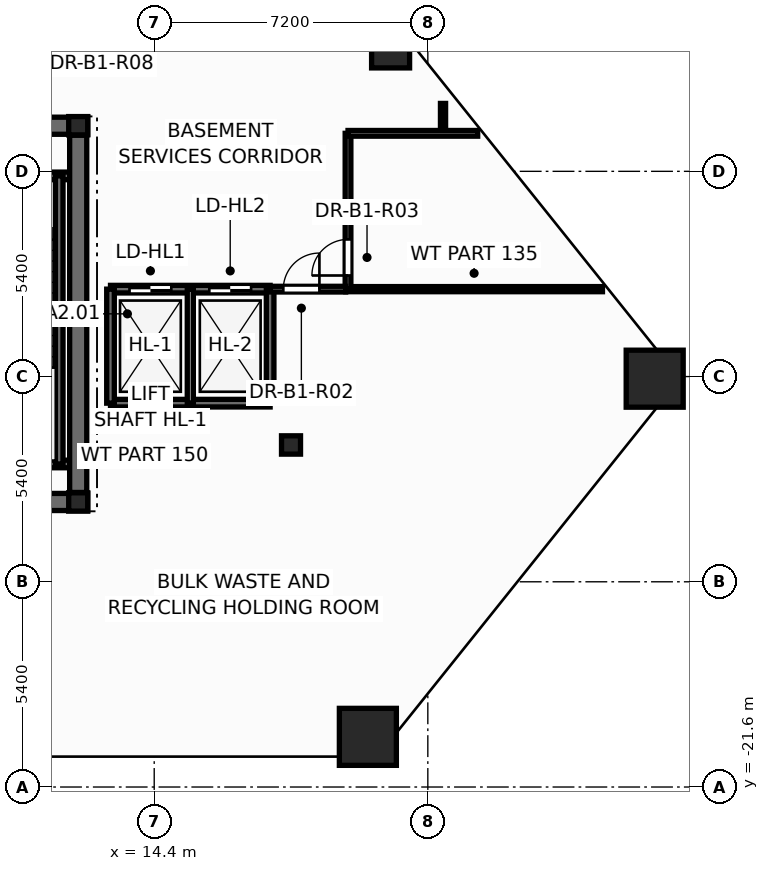
"""IFC4 building model, lengths in metres.
Left out: names, types, materials, properties, quantities, classifications, styles, units other than length and angle.
Written with IfcOpenShell. Run it as: python <this file> out.ifc"""

import sys

from ifc_helpers import new_model, si_unit, direction, frame, frame_2d, origin, origin_2d, place, context, subcontext, project, spatial, rectangle, hollow_rectangle, hollow_circle, i_section, extrude, element, fill, save


model = new_model("IFC4")
c1 = context("Model", 3, precision=1e-05, world=origin(), true_north=direction((0.0, 1.0)))
c2 = subcontext(c1, "Body", "Model", "MODEL_VIEW")
j1 = project(units=[si_unit("LENGTHUNIT", "METRE"), si_unit("PLANEANGLEUNIT", "RADIAN")], contexts=[c1])
p1 = place(None, origin())
s1 = spatial("IfcSite", under=j1, at=p1, CompositionType="ELEMENT")
p2 = place(p1, origin())
s2 = spatial("IfcBuilding", under=s1, at=p2, CompositionType="ELEMENT")
p3 = place(p2, frame((0.0, 0.0, -4.8)))
s3 = spatial("IfcBuildingStorey", under=s2, at=p3, CompositionType="ELEMENT", Elevation=-4.8)
for number, where, z_axis, x_axis in (
    (1, (20.022, -20.28, 0.0), (0.0, 0.0, 1.0), (1.0, 0.0, 0.0)),
    (2, (27.57, -10.856, 0.0), (0.0, 0.0, 1.0), (1.0, 0.0, 0.0)),
):
    element("IfcColumn", number, at=place(p3, frame(where, z_axis=z_axis, x_axis=x_axis)), inside=s3, PredefinedType="COLUMN", context=c2, shape_type="SweptSolid", body=[
        extrude(hollow_rectangle(XDim=1.5, YDim=1.5, WallThickness=0.075, at=origin_2d()), origin(), (0.0, 0.0, 1.0), 4.8),
    ])
p4 = place(p3, frame((20.62, -2.179, 0.0), z_axis=(0.0, 0.0, 1.0), x_axis=(1.0, 0.0, 0.0)))
e3 = element("IfcColumn", 3, at=p4, inside=s3, PredefinedType="COLUMN", context=c2, shape_type="SweptSolid", body=[
    extrude(hollow_circle(Radius=0.5, WallThickness=0.045, at=origin_2d()), origin(), (0.0, 0.0, 1.0), 4.8),
])
for number, where, z_axis, x_axis in (
    (4, (12.4, -14.1, 0.0), (0.0, 0.0, 1.0), (1.0, 0.0, 0.0)),
    (5, (12.4, -4.2, 0.0), (0.0, 0.0, 1.0), (1.0, 0.0, 0.0)),
    (6, (18.0, -12.6, 0.0), (0.0, 0.0, 1.0), (1.0, 0.0, 0.0)),
):
    element("IfcColumn", number, at=place(p3, frame(where, z_axis=z_axis, x_axis=x_axis)), inside=s3, PredefinedType="COLUMN", context=c2, shape_type="SweptSolid", body=[
        extrude(i_section(OverallWidth=0.5, OverallDepth=0.482, WebThickness=0.04, FlangeThickness=0.045, at=origin_2d()), origin(), (0.0, 0.0, 1.0), 4.8),
    ])
p5 = place(p3, frame((-12.65, -14.1, 0.0), z_axis=(0.0, 0.0, 1.0), x_axis=(1.0, 0.0, 0.0)))
e7 = element("IfcWall", 7, at=p5, inside=s3, PredefinedType="SHEAR", context=c2, shape_type="SweptSolid", body=[
    extrude(rectangle(XDim=25.3, YDim=0.45, at=frame_2d((12.65, 0.0))), origin(), (0.0, 0.0, 1.0), 4.8),
])
p6 = place(p3, frame((-12.65, -4.2, 0.0), z_axis=(0.0, 0.0, 1.0), x_axis=(1.0, 0.0, 0.0)))
e8 = element("IfcWall", 8, at=p6, inside=s3, PredefinedType="SHEAR", context=c2, shape_type="SweptSolid", body=[
    extrude(rectangle(XDim=25.3, YDim=0.45, at=frame_2d((12.65, 0.0))), origin(), (0.0, 0.0, 1.0), 4.8),
])
p7 = place(p6, frame((1.85, 0.0, 0.0)))
e9 = element("IfcOpeningElement", 9, at=p7, cuts=e8, PredefinedType="OPENING", context=c2, shape_type="SweptSolid", body=[
    extrude(rectangle(XDim=0.756, YDim=2.054, at=frame_2d((0.375, 1.027))), frame((0.0, 0.235, 0.0), z_axis=(0.0, -1.0, 0.0), x_axis=(1.0, 0.0, 0.0)), (0.0, 0.0, 1.0), 0.47),
])
p8 = place(p6, frame((22.65, 0.0, 0.0)))
e10 = element("IfcOpeningElement", 10, at=p8, cuts=e8, PredefinedType="OPENING", context=c2, shape_type="SweptSolid", body=[
    extrude(rectangle(XDim=0.756, YDim=2.054, at=frame_2d((0.375, 1.027))), frame((0.0, 0.235, 0.0), z_axis=(0.0, -1.0, 0.0), x_axis=(1.0, 0.0, 0.0)), (0.0, 0.0, 1.0), 0.47),
])
p9 = place(p6, frame((5.85, 0.0, 0.0)))
e11 = element("IfcOpeningElement", 11, at=p9, cuts=e8, PredefinedType="OPENING", context=c2, shape_type="SweptSolid", body=[
    extrude(rectangle(XDim=1.006, YDim=2.104, at=frame_2d((0.5, 1.052))), frame((0.0, 0.235, 0.0), z_axis=(0.0, -1.0, 0.0), x_axis=(1.0, 0.0, 0.0)), (0.0, 0.0, 1.0), 0.47),
])
p10 = place(p6, frame((10.35, 0.0, 0.0)))
e12 = element("IfcOpeningElement", 12, at=p10, cuts=e8, PredefinedType="OPENING", context=c2, shape_type="SweptSolid", body=[
    extrude(rectangle(XDim=1.406, YDim=2.154, at=frame_2d((0.7, 1.077))), frame((0.0, 0.235, 0.0), z_axis=(0.0, -1.0, 0.0), x_axis=(1.0, 0.0, 0.0)), (0.0, 0.0, 1.0), 0.47),
])
p11 = place(p6, frame((18.45, 0.0, 0.0)))
e13 = element("IfcOpeningElement", 13, at=p11, cuts=e8, PredefinedType="OPENING", context=c2, shape_type="SweptSolid", body=[
    extrude(rectangle(XDim=1.006, YDim=2.104, at=frame_2d((0.5, 1.052))), frame((0.0, 0.235, 0.0), z_axis=(0.0, -1.0, 0.0), x_axis=(1.0, 0.0, 0.0)), (0.0, 0.0, 1.0), 0.47),
])
for number, where, z_axis, x_axis in (
    (14, (8.48, -5.52, 0.0), (0.0, 0.0, 1.0), (1.0, 0.0, 0.0)),
    (15, (8.48, -13.1, 0.0), (0.0, 0.0, 1.0), (1.0, 0.0, 0.0)),
):
    element("IfcWall", number, at=place(p3, frame(where, z_axis=z_axis, x_axis=x_axis)), inside=s3, PredefinedType="SOLIDWALL", context=c2, shape_type="SweptSolid", body=[
        extrude(rectangle(XDim=3.87, YDim=0.2, at=frame_2d((1.935, 0.0))), origin(), (0.0, 0.0, 1.0), 4.8),
    ])
p12 = place(p3, frame((11.9, -13.1, 0.0), z_axis=(0.0, 0.0, 1.0), x_axis=(0.0, 1.0, 0.0)))
e16 = element("IfcWall", 16, at=p12, inside=s3, PredefinedType="SOLIDWALL", context=c2, shape_type="SweptSolid", body=[
    extrude(rectangle(XDim=7.58, YDim=0.2, at=frame_2d((3.79, 0.0))), origin(), (0.0, 0.0, 1.0), 4.8),
])
p13 = place(p3, frame((12.4, -13.85, 0.0), z_axis=(0.0, 0.0, 1.0), x_axis=(0.0, 1.0, 0.0)))
e17 = element("IfcWall", 17, at=p13, inside=s3, PredefinedType="SHEAR", context=c2, shape_type="SweptSolid", body=[
    extrude(rectangle(XDim=9.4, YDim=0.45, at=frame_2d((4.7, 0.0))), origin(), (0.0, 0.0, 1.0), 4.8),
])
p14 = place(p3, frame((19.44, -8.5, 0.0), z_axis=(0.0, 0.0, 1.0), x_axis=(1.0, 0.0, 0.0)))
e18 = element("IfcWall", 18, at=p14, inside=s3, PredefinedType="PARTITIONING", context=c2, shape_type="SweptSolid", body=[
    extrude(rectangle(XDim=6.755, YDim=0.135, at=frame_2d((3.378, 0.0))), origin(), (0.0, 0.0, 1.0), 3.844),
])
p15 = place(p3, frame((13.25, -11.5, 0.0), z_axis=(0.0, 0.0, 1.0), x_axis=(1.0, 0.0, 0.0)))
e19 = element("IfcWall", 19, at=p15, inside=s3, PredefinedType="SOLIDWALL", context=c2, shape_type="SweptSolid", body=[
    extrude(rectangle(XDim=4.2, YDim=0.2, at=frame_2d((2.1, 0.0))), origin(), (0.0, 0.0, 1.0), 4.8),
])
p16 = place(p3, frame((13.25, -8.5, 0.0), z_axis=(0.0, 0.0, 1.0), x_axis=(1.0, 0.0, 0.0)))
e20 = element("IfcWall", 20, at=p16, inside=s3, PredefinedType="SOLIDWALL", context=c2, shape_type="SweptSolid", body=[
    extrude(rectangle(XDim=4.2, YDim=0.2, at=frame_2d((2.1, 0.0))), origin(), (0.0, 0.0, 1.0), 4.8),
])
p17 = place(p16, frame((0.5, 0.0, 0.0)))
e21 = element("IfcOpeningElement", 21, at=p17, cuts=e20, PredefinedType="OPENING", context=c2, shape_type="SweptSolid", body=[
    extrude(rectangle(XDim=1.106, YDim=2.104, at=frame_2d((0.55, 1.052))), frame((0.0, 0.11, 0.0), z_axis=(0.0, -1.0, 0.0), x_axis=(1.0, 0.0, 0.0)), (0.0, 0.0, 1.0), 0.22),
])
p18 = place(p16, frame((2.6, 0.0, 0.0)))
e22 = element("IfcOpeningElement", 22, at=p18, cuts=e20, PredefinedType="OPENING", context=c2, shape_type="SweptSolid", body=[
    extrude(rectangle(XDim=1.106, YDim=2.104, at=frame_2d((0.55, 1.052))), frame((0.0, 0.11, 0.0), z_axis=(0.0, -1.0, 0.0), x_axis=(1.0, 0.0, 0.0)), (0.0, 0.0, 1.0), 0.22),
])
p19 = place(p3, frame((19.5, -8.5, 0.0), z_axis=(0.0, 0.0, 1.0), x_axis=(0.0, 1.0, 0.0)))
e23 = element("IfcWall", 23, at=p19, inside=s3, PredefinedType="PARTITIONING", context=c2, shape_type="SweptSolid", body=[
    extrude(rectangle(XDim=4.1, YDim=0.15, at=frame_2d((2.05, 0.0))), origin(), (0.0, 0.0, 1.0), 4.48),
])
p20 = place(p19, frame((0.359, 0.0, 0.0)))
e24 = element("IfcOpeningElement", 24, at=p20, cuts=e23, PredefinedType="OPENING", context=c2, shape_type="SweptSolid", body=[
    extrude(rectangle(XDim=0.956, YDim=2.104, at=frame_2d((0.475, 1.052))), frame((0.0, 0.085, 0.0), z_axis=(0.0, -1.0, 0.0), x_axis=(1.0, 0.0, 0.0)), (0.0, 0.0, 1.0), 0.17),
])
p21 = place(p3, frame((19.5, -4.4, 0.0), z_axis=(0.0, 0.0, 1.0), x_axis=(1.0, 0.0, 0.0)))
e25 = element("IfcWall", 25, at=p21, inside=s3, PredefinedType="PARTITIONING", context=c2, shape_type="SweptSolid", body=[
    extrude(rectangle(XDim=3.412, YDim=0.15, at=frame_2d((1.706, 0.0))), origin(), (0.0, 0.0, 1.0), 3.844),
])
for number, where, z_axis, x_axis in (
    (26, (13.25, -11.5, 0.0), (0.0, 0.0, 1.0), (0.0, 1.0, 0.0)),
    (27, (17.45, -11.5, 0.0), (0.0, 0.0, 1.0), (0.0, 1.0, 0.0)),
):
    element("IfcWall", number, at=place(p3, frame(where, z_axis=z_axis, x_axis=x_axis)), inside=s3, PredefinedType="SOLIDWALL", context=c2, shape_type="SweptSolid", body=[
        extrude(rectangle(XDim=3.0, YDim=0.2, at=frame_2d((1.5, 0.0))), origin(), (0.0, 0.0, 1.0), 4.8),
    ])
p22 = place(p3, frame((15.35, -11.5, 0.0), z_axis=(0.0, 0.0, 1.0), x_axis=(0.0, 1.0, 0.0)))
e28 = element("IfcWall", 28, at=p22, inside=s3, PredefinedType="PARTITIONING", context=c2, shape_type="SweptSolid", body=[
    extrude(rectangle(XDim=3.0, YDim=0.16, at=frame_2d((1.5, 0.0))), origin(), (0.0, 0.0, 1.0), 4.48),
])
p23 = place(p3, frame((17.452, -8.5, 0.0), z_axis=(0.0, 0.0, 1.0), x_axis=(1.0, 0.0, 0.0)))
e29 = element("IfcWall", 29, at=p23, inside=s3, PredefinedType="PARTITIONING", context=c2, shape_type="SweptSolid", body=[
    extrude(rectangle(XDim=1.986, YDim=0.15, at=frame_2d((0.993, 0.0))), origin(), (0.0, 0.0, 1.0), 4.48),
])
p24 = place(p23, frame((0.345, 0.0, 0.0)))
e30 = element("IfcOpeningElement", 30, at=p24, cuts=e29, PredefinedType="OPENING", context=c2, shape_type="SweptSolid", body=[
    extrude(rectangle(XDim=0.956, YDim=2.104, at=frame_2d((0.475, 1.052))), frame((0.0, 0.085, 0.0), z_axis=(0.0, -1.0, 0.0), x_axis=(1.0, 0.0, 0.0)), (0.0, 0.0, 1.0), 0.17),
])
p25 = place(p3, frame((22.0, -4.26, 0.0), z_axis=(0.0, 0.0, 1.0), x_axis=(0.0, 1.0, 0.0)))
e31 = element("IfcWall", 31, at=p25, inside=s3, PredefinedType="PARTITIONING", context=c2, shape_type="SweptSolid", body=[
    extrude(rectangle(XDim=0.646, YDim=0.135, at=frame_2d((0.323, 0.0))), origin(), (0.0, 0.0, 1.0), 3.844),
])
p26 = place(p17, origin())
e32 = element("IfcDoor", 32, at=p26, inside=s3, OperationType="DOUBLE_DOOR_SLIDING", PredefinedType="DOOR", context=c2, shape_type="SweptSolid", body=[
    extrude(rectangle(XDim=1.1, YDim=2.1, at=frame_2d((0.55, 1.05))), frame((0.0, 0.025, 0.0), z_axis=(0.0, -1.0, 0.0), x_axis=(1.0, 0.0, 0.0)), (0.0, 0.0, 1.0), 0.05),
])
fill(e21, e32)
p27 = place(p18, origin())
e33 = element("IfcDoor", 33, at=p27, inside=s3, OperationType="DOUBLE_DOOR_SLIDING", PredefinedType="DOOR", context=c2, shape_type="SweptSolid", body=[
    extrude(rectangle(XDim=1.1, YDim=2.1, at=frame_2d((0.55, 1.05))), frame((0.0, 0.025, 0.0), z_axis=(0.0, -1.0, 0.0), x_axis=(1.0, 0.0, 0.0)), (0.0, 0.0, 1.0), 0.05),
])
fill(e22, e33)
p28 = place(p24, origin())
e34 = element("IfcDoor", 34, at=p28, inside=s3, OperationType="SINGLE_SWING_RIGHT", PredefinedType="DOOR", context=c2, shape_type="SweptSolid", body=[
    extrude(rectangle(XDim=0.95, YDim=2.1, at=frame_2d((0.475, 1.05))), frame((0.0, 0.025, 0.0), z_axis=(0.0, -1.0, 0.0), x_axis=(1.0, 0.0, 0.0)), (0.0, 0.0, 1.0), 0.05),
])
fill(e30, e34)
p29 = place(p20, origin())
e35 = element("IfcDoor", 35, at=p29, inside=s3, OperationType="SINGLE_SWING_LEFT", PredefinedType="DOOR", context=c2, shape_type="SweptSolid", body=[
    extrude(rectangle(XDim=0.95, YDim=2.1, at=frame_2d((0.475, 1.05))), frame((0.0, 0.025, 0.0), z_axis=(0.0, -1.0, 0.0), x_axis=(1.0, 0.0, 0.0)), (0.0, 0.0, 1.0), 0.05),
])
fill(e24, e35)
save(model, sys.argv[1])
